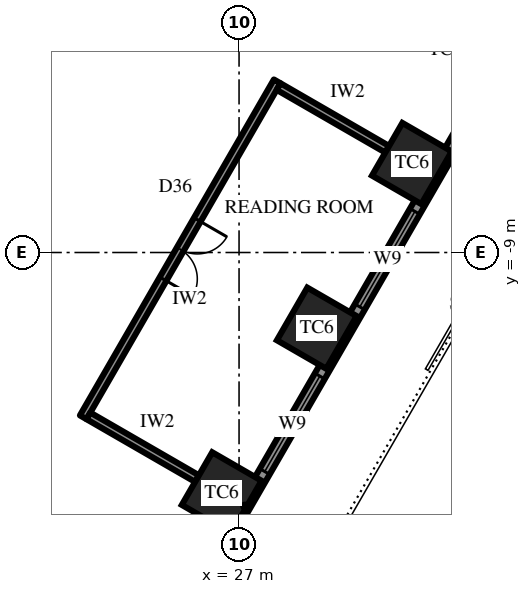
"""IFC4 building model, lengths in metres.
Left out: names, types, materials, properties, quantities, classifications, styles, units other than length and angle.
Written with IfcOpenShell. Run it as: python <this file> out.ifc"""

import sys

from ifc_helpers import new_model, si_unit, direction, frame, frame_2d, origin, origin_2d, place, context, subcontext, project, spatial, rectangle, extrude, element, fill, save


model = new_model("IFC4")
c1 = context("Model", 3, precision=1e-05, world=origin(), true_north=direction((0.0, 1.0)))
c2 = subcontext(c1, "Body", "Model", "MODEL_VIEW")
j1 = project(units=[si_unit("LENGTHUNIT", "METRE"), si_unit("PLANEANGLEUNIT", "RADIAN")], contexts=[c1])
p1 = place(None, origin())
s1 = spatial("IfcSite", under=j1, at=p1, CompositionType="ELEMENT")
p2 = place(p1, origin())
s2 = spatial("IfcBuilding", under=s1, at=p2, CompositionType="ELEMENT")
p3 = place(p2, frame((0.0, 0.0, 153.1)))
s3 = spatial("IfcBuildingStorey", under=s2, at=p3, CompositionType="ELEMENT", Elevation=153.1)
for number, where, z_axis, x_axis in (
    (1, (26.544, -15.325, 0.0), (0.0, 0.0, 1.0), (0.5, 0.866, 0.0)),
    (2, (29.045, -10.992, 0.0), (0.0, 0.0, 1.0), (0.5, 0.866, 0.0)),
    (3, (31.547, -6.658, 0.0), (0.0, 0.0, 1.0), (0.5, 0.866, 0.0)),
):
    element("IfcColumn", number, at=place(p3, frame(where, z_axis=z_axis, x_axis=x_axis)), inside=s3, PredefinedType="COLUMN", context=c2, shape_type="SweptSolid", body=[
        extrude(rectangle(XDim=1.6, YDim=1.5, at=origin_2d()), origin(), (0.0, 0.0, 1.0), 4.2),
    ])
p4 = place(p3, frame((19.644, -28.675, 0.0), z_axis=(0.0, 0.0, 1.0), x_axis=(0.500003084452, 0.866023622968, 0.0)))
e4 = element("IfcWall", 4, at=p4, inside=s3, PredefinedType="SOLIDWALL", context=c2, shape_type="SweptSolid", body=[
    extrude(rectangle(XDim=30.022, YDim=0.3, at=frame_2d((15.011, 0.0))), origin(), (0.0, 0.0, 1.0), 2.75),
])
p5 = place(p4, frame((1.052, 0.0, 0.6)))
e5 = element("IfcOpeningElement", 5, at=p5, cuts=e4, PredefinedType="OPENING", context=c2, shape_type="SweptSolid", body=[
    extrude(rectangle(XDim=2.9, YDim=1.9, at=frame_2d((1.45, 0.95))), frame((0.0, 0.16, 0.0), z_axis=(0.0, -1.0, 0.0), x_axis=(1.0, 0.0, 0.0)), (0.0, 0.0, 1.0), 0.32),
])
p6 = place(p4, frame((6.056, 0.0, 0.6)))
e6 = element("IfcOpeningElement", 6, at=p6, cuts=e4, PredefinedType="OPENING", context=c2, shape_type="SweptSolid", body=[
    extrude(rectangle(XDim=2.9, YDim=1.9, at=frame_2d((1.45, 0.95))), frame((0.0, 0.16, 0.0), z_axis=(0.0, -1.0, 0.0), x_axis=(1.0, 0.0, 0.0)), (0.0, 0.0, 1.0), 0.32),
])
p7 = place(p4, frame((11.909, 0.0, 0.0)))
e7 = element("IfcOpeningElement", 7, at=p7, cuts=e4, PredefinedType="OPENING", context=c2, shape_type="SweptSolid", body=[
    extrude(rectangle(XDim=1.2, YDim=2.4, at=frame_2d((0.6, 1.2))), frame((0.0, 0.16, 0.0), z_axis=(0.0, -1.0, 0.0), x_axis=(1.0, 0.0, 0.0)), (0.0, 0.0, 1.0), 0.32),
])
p8 = place(p4, frame((16.063, 0.0, 0.6)))
e8 = element("IfcOpeningElement", 8, at=p8, cuts=e4, PredefinedType="OPENING", context=c2, shape_type="SweptSolid", body=[
    extrude(rectangle(XDim=2.9, YDim=1.9, at=frame_2d((1.45, 0.95))), frame((0.0, 0.16, 0.0), z_axis=(0.0, -1.0, 0.0), x_axis=(1.0, 0.0, 0.0)), (0.0, 0.0, 1.0), 0.32),
])
p9 = place(p4, frame((21.067, 0.0, 0.6)))
e9 = element("IfcOpeningElement", 9, at=p9, cuts=e4, PredefinedType="OPENING", context=c2, shape_type="SweptSolid", body=[
    extrude(rectangle(XDim=2.9, YDim=1.9, at=frame_2d((1.45, 0.95))), frame((0.0, 0.16, 0.0), z_axis=(0.0, -1.0, 0.0), x_axis=(1.0, 0.0, 0.0)), (0.0, 0.0, 1.0), 0.32),
])
p10 = place(p4, frame((26.07, 0.0, 0.6)))
e10 = element("IfcOpeningElement", 10, at=p10, cuts=e4, PredefinedType="OPENING", context=c2, shape_type="SweptSolid", body=[
    extrude(rectangle(XDim=2.9, YDim=1.9, at=frame_2d((1.45, 0.95))), frame((0.0, 0.16, 0.0), z_axis=(0.0, -1.0, 0.0), x_axis=(1.0, 0.0, 0.0)), (0.0, 0.0, 1.0), 0.32),
])
p11 = place(p3, frame((22.9, -13.337, 0.0), z_axis=(0.0, 0.0, 1.0), x_axis=(0.500005407604, 0.86602228168, 0.0)))
e11 = element("IfcWall", 11, at=p11, inside=s3, PredefinedType="PARTITIONING", context=c2, shape_type="SweptSolid", body=[
    extrude(rectangle(XDim=10.208, YDim=0.2, at=frame_2d((5.104, 0.0))), origin(), (0.0, 0.0, 1.0), 4.0),
])
p12 = place(p11, frame((4.204, 0.0, 0.0)))
e12 = element("IfcOpeningElement", 12, at=p12, cuts=e11, PredefinedType="OPENING", context=c2, shape_type="SweptSolid", body=[
    extrude(rectangle(XDim=1.8, YDim=2.4, at=frame_2d((0.9, 1.2))), frame((0.0, 0.11, 0.0), z_axis=(0.0, -1.0, 0.0), x_axis=(1.0, 0.0, 0.0)), (0.0, 0.0, 1.0), 0.22),
])
p13 = place(p3, frame((23.036, -13.3, 0.0), z_axis=(0.0, 0.0, 1.0), x_axis=(0.866021716278, -0.500006386895, 0.0)))
e13 = element("IfcWall", 13, at=p13, inside=s3, PredefinedType="PARTITIONING", context=c2, shape_type="SweptSolid", body=[
    extrude(rectangle(XDim=3.3, YDim=0.2, at=frame_2d((1.65, 0.0))), origin(), (0.0, 0.0, 1.0), 4.0),
])
p14 = place(p3, frame((28.04, -4.633, 0.0), z_axis=(0.0, 0.0, 1.0), x_axis=(0.866008176907, -0.50002983664, 0.0)))
e14 = element("IfcWall", 14, at=p14, inside=s3, PredefinedType="PARTITIONING", context=c2, shape_type="SweptSolid", body=[
    extrude(rectangle(XDim=3.3, YDim=0.2, at=frame_2d((1.65, 0.0))), origin(), (0.0, 0.0, 1.0), 3.082),
])
p15 = place(p8, origin())
e15 = element("IfcWindow", 15, at=p15, inside=s3, PartitioningType="SINGLE_PANEL", PredefinedType="WINDOW", context=c2, shape_type="SweptSolid", body=[
    extrude(rectangle(XDim=2.9, YDim=1.9, at=frame_2d((1.45, 0.95))), frame((0.0, 0.03, 0.0), z_axis=(0.0, -1.0, 0.0), x_axis=(1.0, 0.0, 0.0)), (0.0, 0.0, 1.0), 0.06),
])
fill(e8, e15)
p16 = place(p9, origin())
e16 = element("IfcWindow", 16, at=p16, inside=s3, PartitioningType="SINGLE_PANEL", PredefinedType="WINDOW", context=c2, shape_type="SweptSolid", body=[
    extrude(rectangle(XDim=2.9, YDim=1.9, at=frame_2d((1.45, 0.95))), frame((0.0, 0.03, 0.0), z_axis=(0.0, -1.0, 0.0), x_axis=(1.0, 0.0, 0.0)), (0.0, 0.0, 1.0), 0.06),
])
fill(e9, e16)
p17 = place(p12, frame((1.8, 0.0, 0.0), z_axis=(0.0, 0.0, 1.0), x_axis=(-1.0, 0.0, 0.0)))
e17 = element("IfcDoor", 17, at=p17, inside=s3, OperationType="DOUBLE_DOOR_SINGLE_SWING", PredefinedType="DOOR", context=c2, shape_type="SweptSolid", body=[
    extrude(rectangle(XDim=1.8, YDim=2.4, at=frame_2d((0.9, 1.2))), frame((0.0, 0.025, 0.0), z_axis=(0.0, -1.0, 0.0), x_axis=(1.0, 0.0, 0.0)), (0.0, 0.0, 1.0), 0.05),
])
fill(e12, e17)
save(model, sys.argv[1])
